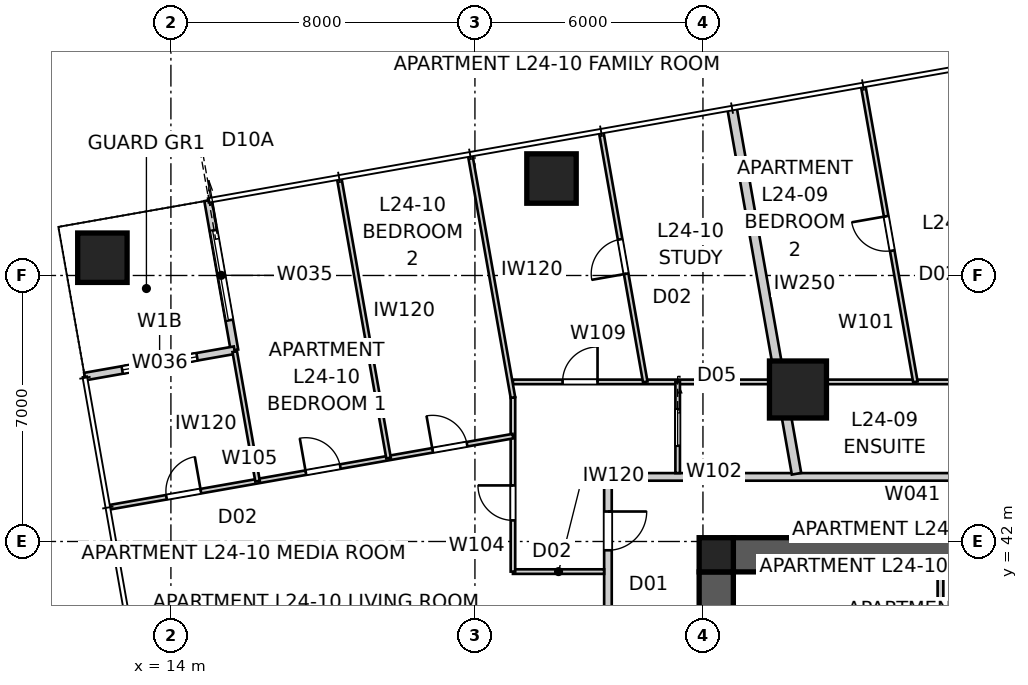
"""IFC4 building model, lengths in metres.
Left out: names, types, materials, properties, quantities, classifications, styles, units other than length and angle.
Written with IfcOpenShell. Run it as: python <this file> out.ifc"""

import sys

from ifc_helpers import new_model, si_unit, direction, frame, frame_2d, origin, origin_2d, place, context, subcontext, project, spatial, polyline, rectangle, outline, extrude, element, fill, save


model = new_model("IFC4")
c1 = context("Model", 3, precision=1e-05, world=origin(), true_north=direction((0.0, 1.0)))
c2 = subcontext(c1, "Body", "Model", "MODEL_VIEW")
j1 = project(units=[si_unit("LENGTHUNIT", "METRE"), si_unit("PLANEANGLEUNIT", "RADIAN")], contexts=[c1])
p1 = place(None, origin())
s1 = spatial("IfcSite", under=j1, at=p1, CompositionType="ELEMENT")
p2 = place(p1, origin())
s2 = spatial("IfcBuilding", under=s1, at=p2, CompositionType="ELEMENT")
p3 = place(p2, frame((0.0, 0.0, 89.6)))
s3 = spatial("IfcBuildingStorey", under=s2, at=p3, CompositionType="ELEMENT", Elevation=89.6)
p4 = place(p3, frame((28.8, 41.65, 0.0), z_axis=(0.0, 0.0, 1.0), x_axis=(1.0, 0.0, 0.0)))
e1 = element("IfcWall", 1, at=p4, inside=s3, PredefinedType="SHEAR", context=c2, shape_type="SweptSolid", body=[
    extrude(outline(polyline([(0.0, -0.45), (22.4, -0.45), (22.4, -0.025), (22.85, -0.025), (22.85, 0.025), (22.4, 0.025), (22.4, 0.45), (0.0, 0.45), (0.0, 0.025), (-0.45, 0.025), (-0.45, -0.025), (0.0, -0.025), (0.0, -0.45)])), origin(), (0.0, 0.0, 1.0), 3.4),
])
p5 = place(p3, frame((28.35, 41.2, 0.0), z_axis=(0.0, 0.0, 1.0), x_axis=(0.0, -1.0, 0.0)))
e2 = element("IfcWall", 2, at=p5, inside=s3, PredefinedType="SHEAR", context=c2, shape_type="SweptSolid", body=[
    extrude(outline(polyline([(0.0, -0.45), (22.4, -0.45), (22.4, -0.025), (22.85, -0.025), (22.85, 0.025), (22.4, 0.025), (22.4, 0.45), (0.0, 0.45), (0.0, 0.025), (-0.45, 0.025), (-0.45, -0.025), (0.0, -0.025), (0.0, -0.45)])), origin(), (0.0, 0.0, 1.0), 3.4),
])
p6 = place(p5, frame((11.14, 0.0, 0.0)))
e3 = element("IfcOpeningElement", 3, at=p6, cuts=e2, PredefinedType="OPENING", context=c2, shape_type="SweptSolid", body=[
    extrude(rectangle(XDim=1.02, YDim=2.4, at=frame_2d((0.51, 1.2))), frame((0.0, 0.46, 0.0), z_axis=(0.0, -1.0, 0.0), x_axis=(1.0, 0.0, 0.0)), (0.0, 0.0, 1.0), 0.92),
])
p7 = place(p3, frame((28.35, 41.65, 0.0), z_axis=(0.0, 0.0, 1.0), x_axis=(1.0, 0.0, 0.0)))
e4 = element("IfcColumn", 4, at=p7, inside=s3, PredefinedType="COLUMN", context=c2, shape_type="SweptSolid", body=[
    extrude(rectangle(XDim=0.9, YDim=0.9, at=origin_2d()), origin(), (0.0, 0.0, 1.0), 3.4),
])
for number, where, z_axis, x_axis in (
    (5, (24.015, 51.552, 0.0), (0.0, 0.0, 1.0), (1.0, 0.0, 0.0)),
    (6, (12.197, 49.468, 0.0), (0.0, 0.0, 1.0), (1.0, 0.0, 0.0)),
):
    element("IfcColumn", number, at=place(p3, frame(where, z_axis=z_axis, x_axis=x_axis)), inside=s3, PredefinedType="COLUMN", context=c2, shape_type="SweptSolid", body=[
        extrude(rectangle(XDim=1.3, YDim=1.3, at=origin_2d()), origin(), (0.0, 0.0, 1.0), 3.4),
    ])
p8 = place(p3, frame((30.5, 46.0, 0.0), z_axis=(0.0, 0.0, 1.0), x_axis=(1.0, 0.0, 0.0)))
e7 = element("IfcColumn", 7, at=p8, inside=s3, PredefinedType="COLUMN", context=c2, shape_type="SweptSolid", body=[
    extrude(rectangle(XDim=1.5, YDim=1.5, at=origin_2d()), origin(), (0.0, 0.0, 1.0), 3.4),
])
p9 = place(p3, frame((14.978, 50.974, 0.0), z_axis=(0.0, 0.0, 1.0), x_axis=(0.173646056486, -0.984808127031, 0.0)))
e8 = element("IfcWall", 8, at=p9, inside=s3, PredefinedType="SOLIDWALL", context=c2, shape_type="SweptSolid", body=[
    extrude(rectangle(XDim=4.0, YDim=0.2, at=frame_2d((2.0, 0.0))), origin(), (0.0, 0.0, 1.0), 3.25),
])
p10 = place(p9, frame((0.8, 0.0, 0.0)))
e9 = element("IfcOpeningElement", 9, at=p10, cuts=e8, PredefinedType="OPENING", context=c2, shape_type="SweptSolid", body=[
    extrude(rectangle(XDim=2.4, YDim=2.1, at=frame_2d((1.2, 1.05))), frame((0.0, 0.11, 0.0), z_axis=(0.0, -1.0, 0.0), x_axis=(1.0, 0.0, 0.0)), (0.0, 0.0, 1.0), 0.22),
])
p11 = place(p3, frame((15.672, 47.034, 0.0), z_axis=(0.0, 0.0, 1.0), x_axis=(-0.984808127031, -0.173646056486, 0.0)))
e10 = element("IfcWall", 10, at=p11, inside=s3, PredefinedType="SOLIDWALL", context=c2, shape_type="SweptSolid", body=[
    extrude(rectangle(XDim=4.0, YDim=0.2, at=frame_2d((2.0, 0.0))), origin(), (0.0, 0.0, 1.0), 3.25),
])
p12 = place(p11, frame((1.0, 0.0, 0.45)))
e11 = element("IfcOpeningElement", 11, at=p12, cuts=e10, PredefinedType="OPENING", context=c2, shape_type="SweptSolid", body=[
    extrude(rectangle(XDim=2.0, YDim=1.8, at=frame_2d((1.0, 0.9))), frame((0.0, 0.11, 0.0), z_axis=(0.0, -1.0, 0.0), x_axis=(1.0, 0.0, 0.0)), (0.0, 0.0, 1.0), 0.22),
])
p13 = place(p3, frame((54.5, 43.7, 0.0), z_axis=(0.0, 0.0, 1.0), x_axis=(-1.0, 0.0, 0.0)))
e12 = element("IfcWall", 12, at=p13, inside=s3, PredefinedType="PARTITIONING", context=c2, shape_type="SweptSolid", body=[
    extrude(rectangle(XDim=29.0, YDim=0.2, at=frame_2d((14.5, 0.0))), origin(), (0.0, 0.0, 1.0), 3.25),
])
p14 = place(p13, frame((11.951, 0.0, 0.0)))
e13 = element("IfcOpeningElement", 13, at=p14, cuts=e12, PredefinedType="OPENING", context=c2, shape_type="SweptSolid", body=[
    extrude(rectangle(XDim=1.02, YDim=2.34, at=frame_2d((0.51, 1.17))), frame((0.0, 0.11, 0.0), z_axis=(0.0, -1.0, 0.0), x_axis=(1.0, 0.0, 0.0)), (0.0, 0.0, 1.0), 0.22),
])
p15 = place(p13, frame((4.795, 0.0, 0.0)))
e14 = element("IfcOpeningElement", 14, at=p15, cuts=e12, PredefinedType="OPENING", context=c2, shape_type="SweptSolid", body=[
    extrude(rectangle(XDim=1.02, YDim=2.34, at=frame_2d((0.51, 1.17))), frame((0.0, 0.11, 0.0), z_axis=(0.0, -1.0, 0.0), x_axis=(1.0, 0.0, 0.0)), (0.0, 0.0, 1.0), 0.22),
])
p16 = place(p3, frame((25.5, 43.7, 0.0), z_axis=(0.0, 0.0, 1.0), x_axis=(0.0, -1.0, 0.0)))
e15 = element("IfcWall", 15, at=p16, inside=s3, PredefinedType="PARTITIONING", context=c2, shape_type="SweptSolid", body=[
    extrude(rectangle(XDim=27.4, YDim=0.2, at=frame_2d((13.7, 0.0))), origin(), (0.0, 0.0, 1.0), 3.25),
])
p17 = place(p16, frame((24.333, 0.0, 0.0)))
e16 = element("IfcOpeningElement", 16, at=p17, cuts=e15, PredefinedType="OPENING", context=c2, shape_type="SweptSolid", body=[
    extrude(rectangle(XDim=1.02, YDim=2.1, at=frame_2d((0.51, 1.05))), frame((0.0, 0.11, 0.0), z_axis=(0.0, -1.0, 0.0), x_axis=(1.0, 0.0, 0.0)), (0.0, 0.0, 1.0), 0.22),
])
p18 = place(p16, frame((10.631, 0.0, 0.0)))
e17 = element("IfcOpeningElement", 17, at=p18, cuts=e15, PredefinedType="OPENING", context=c2, shape_type="SweptSolid", body=[
    extrude(rectangle(XDim=1.02, YDim=2.34, at=frame_2d((0.51, 1.17))), frame((0.0, 0.11, 0.0), z_axis=(0.0, -1.0, 0.0), x_axis=(1.0, 0.0, 0.0)), (0.0, 0.0, 1.0), 0.22),
])
p19 = place(p16, frame((0.911, 0.0, 0.0)))
e18 = element("IfcOpeningElement", 18, at=p19, cuts=e15, PredefinedType="OPENING", context=c2, shape_type="SweptSolid", body=[
    extrude(rectangle(XDim=1.02, YDim=2.34, at=frame_2d((0.51, 1.17))), frame((0.0, 0.11, 0.0), z_axis=(0.0, -1.0, 0.0), x_axis=(1.0, 0.0, 0.0)), (0.0, 0.0, 1.0), 0.22),
])
p20 = place(p3, frame((28.765, 53.405, 0.0), z_axis=(0.0, 0.0, 1.0), x_axis=(0.173658469802, -0.984805938176, 0.0)))
e19 = element("IfcWall", 19, at=p20, inside=s3, PredefinedType="PARTITIONING", context=c2, shape_type="SweptSolid", body=[
    extrude(rectangle(XDim=9.771, YDim=0.25, at=frame_2d((4.885, 0.0))), origin(), (0.0, 0.0, 1.0), 3.25),
])
p21 = place(p3, frame((34.25, 41.2, 0.0), z_axis=(0.0, 0.0, 1.0), x_axis=(0.0, -1.0, 0.0)))
e20 = element("IfcWall", 20, at=p21, inside=s3, PredefinedType="SOLIDWALL", context=c2, shape_type="SweptSolid", body=[
    extrude(rectangle(XDim=5.95, YDim=0.15, at=frame_2d((2.975, 0.0))), origin(), (0.0, 0.0, 1.0), 3.25),
])
p22 = place(p21, frame((2.515, 0.0, 0.0)))
e21 = element("IfcOpeningElement", 21, at=p22, cuts=e20, PredefinedType="OPENING", context=c2, shape_type="SweptSolid", body=[
    extrude(rectangle(XDim=0.92, YDim=2.1, at=frame_2d((0.46, 1.05))), frame((0.0, 0.085, 0.0), z_axis=(0.0, -1.0, 0.0), x_axis=(1.0, 0.0, 0.0)), (0.0, 0.0, 1.0), 0.17),
])
p23 = place(p3, frame((23.0, 46.2, 0.0), z_axis=(0.0, 0.0, 1.0), x_axis=(1.0, 0.0, 0.0)))
e22 = element("IfcWall", 22, at=p23, inside=s3, PredefinedType="PARTITIONING", context=c2, shape_type="SweptSolid", body=[
    extrude(rectangle(XDim=34.0, YDim=0.12, at=frame_2d((17.0, 0.0))), origin(), (0.0, 0.0, 1.0), 2.55),
])
p24 = place(p23, frame((18.989, 0.0, 0.0)))
e23 = element("IfcOpeningElement", 23, at=p24, cuts=e22, PredefinedType="OPENING", context=c2, shape_type="SweptSolid", body=[
    extrude(rectangle(XDim=0.92, YDim=2.34, at=frame_2d((0.46, 1.17))), frame((0.0, 0.07, 0.0), z_axis=(0.0, -1.0, 0.0), x_axis=(1.0, 0.0, 0.0)), (0.0, 0.0, 1.0), 0.14),
])
p25 = place(p23, frame((1.306, 0.0, 0.0)))
e24 = element("IfcOpeningElement", 24, at=p25, cuts=e22, PredefinedType="OPENING", context=c2, shape_type="SweptSolid", body=[
    extrude(rectangle(XDim=0.92, YDim=2.34, at=frame_2d((0.46, 1.17))), frame((0.0, 0.07, 0.0), z_axis=(0.0, -1.0, 0.0), x_axis=(1.0, 0.0, 0.0)), (0.0, 0.0, 1.0), 0.14),
])
p26 = place(p23, frame((13.884, 0.0, 0.0)))
e25 = element("IfcOpeningElement", 25, at=p26, cuts=e22, PredefinedType="OPENING", context=c2, shape_type="SweptSolid", body=[
    extrude(rectangle(XDim=0.96, YDim=2.1, at=frame_2d((0.48, 1.05))), frame((0.0, 0.07, 0.0), z_axis=(0.0, -1.0, 0.0), x_axis=(1.0, 0.0, 0.0)), (0.0, 0.0, 1.0), 0.14),
])
p27 = place(p23, frame((21.929, 0.0, 0.0)))
e26 = element("IfcOpeningElement", 26, at=p27, cuts=e22, PredefinedType="OPENING", context=c2, shape_type="SweptSolid", body=[
    extrude(rectangle(XDim=0.96, YDim=2.1, at=frame_2d((0.48, 1.05))), frame((0.0, 0.07, 0.0), z_axis=(0.0, -1.0, 0.0), x_axis=(1.0, 0.0, 0.0)), (0.0, 0.0, 1.0), 0.14),
])
p28 = place(p3, frame((33.59, 46.2, 0.0), z_axis=(0.0, 0.0, 1.0), x_axis=(-0.173645935638, 0.98480814834, 0.0)))
e27 = element("IfcWall", 27, at=p28, inside=s3, PredefinedType="PARTITIONING", context=c2, shape_type="SweptSolid", body=[
    extrude(rectangle(XDim=7.893, YDim=0.12, at=frame_2d((3.947, 0.0))), origin(), (0.0, 0.0, 1.0), 3.25),
])
p29 = place(p28, frame((3.507, 0.0, 0.0)))
e28 = element("IfcOpeningElement", 28, at=p29, cuts=e27, PredefinedType="OPENING", context=c2, shape_type="SweptSolid", body=[
    extrude(rectangle(XDim=0.92, YDim=2.34, at=frame_2d((0.46, 1.17))), frame((0.0, 0.07, 0.0), z_axis=(0.0, -1.0, 0.0), x_axis=(1.0, 0.0, 0.0)), (0.0, 0.0, 1.0), 0.14),
])
p30 = place(p3, frame((27.335, 46.2, 0.0), z_axis=(0.0, 0.0, 1.0), x_axis=(0.0, -1.0, 0.0)))
e29 = element("IfcWall", 29, at=p30, inside=s3, PredefinedType="PARTITIONING", context=c2, shape_type="SweptSolid", body=[
    extrude(rectangle(XDim=2.4, YDim=0.12, at=frame_2d((1.2, 0.0))), origin(), (0.0, 0.0, 1.0), 2.722),
])
p31 = place(p30, frame((0.72, 0.0, 0.0)))
e30 = element("IfcOpeningElement", 30, at=p31, cuts=e29, PredefinedType="OPENING", context=c2, shape_type="SweptSolid", body=[
    extrude(rectangle(XDim=0.96, YDim=2.1, at=frame_2d((0.48, 1.05))), frame((0.0, 0.07, 0.0), z_axis=(0.0, -1.0, 0.0), x_axis=(1.0, 0.0, 0.0)), (0.0, 0.0, 1.0), 0.14),
])
p32 = place(p3, frame((25.4, 41.208, 0.0), z_axis=(0.0, 0.0, 1.0), x_axis=(-1.0, 0.0, 0.0)))
e31 = element("IfcWall", 31, at=p32, inside=s3, PredefinedType="PARTITIONING", context=c2, shape_type="SweptSolid", body=[
    extrude(rectangle(XDim=2.4, YDim=0.12, at=frame_2d((1.2, 0.0))), origin(), (0.0, 0.0, 1.0), 2.638),
])
p33 = place(p3, frame((23.0, 41.208, 0.0), z_axis=(0.0, 0.0, 1.0), x_axis=(0.0, 1.0, 0.0)))
e32 = element("IfcWall", 32, at=p33, inside=s3, PredefinedType="PARTITIONING", context=c2, shape_type="SweptSolid", body=[
    extrude(rectangle(XDim=4.581, YDim=0.12, at=frame_2d((2.291, 0.0))), origin(), (0.0, 0.0, 1.0), 2.638),
])
p34 = place(p33, frame((1.348, 0.0, 0.0)))
e33 = element("IfcOpeningElement", 33, at=p34, cuts=e32, PredefinedType="OPENING", context=c2, shape_type="SweptSolid", body=[
    extrude(rectangle(XDim=0.92, YDim=2.34, at=frame_2d((0.46, 1.17))), frame((0.0, 0.07, 0.0), z_axis=(0.0, -1.0, 0.0), x_axis=(1.0, 0.0, 0.0)), (0.0, 0.0, 1.0), 0.14),
])
p35 = place(p3, frame((12.38, 42.9, 0.0), z_axis=(0.0, 0.0, 1.0), x_axis=(0.984807253583, 0.173651010046, 0.0)))
e34 = element("IfcWall", 34, at=p35, inside=s3, PredefinedType="PARTITIONING", context=c2, shape_type="SweptSolid", body=[
    extrude(rectangle(XDim=10.783, YDim=0.12, at=frame_2d((5.392, 0.0))), origin(), (0.0, 0.0, 1.0), 3.25),
])
p36 = place(p35, frame((1.525, 0.0, 0.0)))
e35 = element("IfcOpeningElement", 35, at=p36, cuts=e34, PredefinedType="OPENING", context=c2, shape_type="SweptSolid", body=[
    extrude(rectangle(XDim=0.92, YDim=2.34, at=frame_2d((0.46, 1.17))), frame((0.0, 0.07, 0.0), z_axis=(0.0, -1.0, 0.0), x_axis=(1.0, 0.0, 0.0)), (0.0, 0.0, 1.0), 0.14),
])
p37 = place(p35, frame((5.25, 0.0, 0.0)))
e36 = element("IfcOpeningElement", 36, at=p37, cuts=e34, PredefinedType="OPENING", context=c2, shape_type="SweptSolid", body=[
    extrude(rectangle(XDim=0.92, YDim=2.34, at=frame_2d((0.46, 1.17))), frame((0.0, 0.07, 0.0), z_axis=(0.0, -1.0, 0.0), x_axis=(1.0, 0.0, 0.0)), (0.0, 0.0, 1.0), 0.14),
])
p38 = place(p35, frame((8.637, 0.0, 0.0)))
e37 = element("IfcOpeningElement", 37, at=p38, cuts=e34, PredefinedType="OPENING", context=c2, shape_type="SweptSolid", body=[
    extrude(rectangle(XDim=0.92, YDim=2.34, at=frame_2d((0.46, 1.17))), frame((0.0, 0.07, 0.0), z_axis=(0.0, -1.0, 0.0), x_axis=(1.0, 0.0, 0.0)), (0.0, 0.0, 1.0), 0.14),
])
p39 = place(p3, frame((18.432, 51.542, 0.0), z_axis=(0.0, 0.0, 1.0), x_axis=(0.173647177755, -0.984807929323, 0.0)))
e38 = element("IfcWall", 38, at=p39, inside=s3, PredefinedType="PARTITIONING", context=c2, shape_type="SweptSolid", body=[
    extrude(rectangle(XDim=7.46, YDim=0.12, at=frame_2d((3.73, 0.0))), origin(), (0.0, 0.0, 1.0), 3.25),
])
p40 = place(p3, frame((16.28, 43.588, 0.0), z_axis=(0.0, 0.0, 1.0), x_axis=(-0.173660541335, 0.984805572884, 0.0)))
e39 = element("IfcWall", 39, at=p40, inside=s3, PredefinedType="PARTITIONING", context=c2, shape_type="SweptSolid", body=[
    extrude(rectangle(XDim=3.46, YDim=0.12, at=frame_2d((1.73, 0.0))), origin(), (0.0, 0.0, 1.0), 3.25),
])
p41 = place(p3, frame((21.878, 52.15, 0.0), z_axis=(0.0, 0.0, 1.0), x_axis=(0.173653792983, -0.984806762864, 0.0)))
e40 = element("IfcWall", 40, at=p41, inside=s3, PredefinedType="PARTITIONING", context=c2, shape_type="SweptSolid", body=[
    extrude(rectangle(XDim=6.459, YDim=0.12, at=frame_2d((3.229, 0.0))), origin(), (0.0, 0.0, 1.0), 2.638),
])
p42 = place(p3, frame((26.481, 46.2, 0.0), z_axis=(0.0, 0.0, 1.0), x_axis=(-0.173643103339, 0.98480864774, 0.0)))
e41 = element("IfcWall", 41, at=p42, inside=s3, PredefinedType="PARTITIONING", context=c2, shape_type="SweptSolid", body=[
    extrude(rectangle(XDim=6.659, YDim=0.12, at=frame_2d((3.329, 0.0))), origin(), (0.0, 0.0, 1.0), 3.25),
])
p43 = place(p42, frame((2.889, 0.0, 0.0)))
e42 = element("IfcOpeningElement", 42, at=p43, cuts=e41, PredefinedType="OPENING", context=c2, shape_type="SweptSolid", body=[
    extrude(rectangle(XDim=0.92, YDim=2.34, at=frame_2d((0.46, 1.17))), frame((0.0, 0.07, 0.0), z_axis=(0.0, -1.0, 0.0), x_axis=(1.0, 0.0, 0.0)), (0.0, 0.0, 1.0), 0.14),
])
p44 = place(p10, origin())
e43 = element("IfcDoor", 43, at=p44, inside=s3, OperationType="SLIDING_TO_LEFT", PredefinedType="DOOR", context=c2, shape_type="SweptSolid", body=[
    extrude(rectangle(XDim=2.4, YDim=2.1, at=frame_2d((1.2, 1.05))), frame((0.0, 0.025, 0.0), z_axis=(0.0, -1.0, 0.0), x_axis=(1.0, 0.0, 0.0)), (0.0, 0.0, 1.0), 0.05),
])
fill(e9, e43)
p45 = place(p12, origin())
e44 = element("IfcWindow", 44, at=p45, inside=s3, PartitioningType="SINGLE_PANEL", PredefinedType="WINDOW", context=c2, shape_type="SweptSolid", body=[
    extrude(rectangle(XDim=2.0, YDim=1.8, at=frame_2d((1.0, 0.9))), frame((0.0, 0.03, 0.0), z_axis=(0.0, -1.0, 0.0), x_axis=(1.0, 0.0, 0.0)), (0.0, 0.0, 1.0), 0.06),
])
fill(e11, e44)
p46 = place(p19, origin())
e45 = element("IfcDoor", 45, at=p46, inside=s3, OperationType="SINGLE_SWING_LEFT", PredefinedType="DOOR", context=c2, shape_type="SweptSolid", body=[
    extrude(rectangle(XDim=1.02, YDim=2.34, at=frame_2d((0.51, 1.17))), frame((0.0, 0.025, 0.0), z_axis=(0.0, -1.0, 0.0), x_axis=(1.0, 0.0, 0.0)), (0.0, 0.0, 1.0), 0.05),
])
fill(e18, e45)
p47 = place(p34, origin())
e46 = element("IfcDoor", 46, at=p47, inside=s3, OperationType="SINGLE_SWING_RIGHT", PredefinedType="DOOR", context=c2, shape_type="SweptSolid", body=[
    extrude(rectangle(XDim=0.92, YDim=2.34, at=frame_2d((0.46, 1.17))), frame((0.0, 0.025, 0.0), z_axis=(0.0, -1.0, 0.0), x_axis=(1.0, 0.0, 0.0)), (0.0, 0.0, 1.0), 0.05),
])
fill(e33, e46)
p48 = place(p25, origin())
e47 = element("IfcDoor", 47, at=p48, inside=s3, OperationType="SINGLE_SWING_RIGHT", PredefinedType="DOOR", context=c2, shape_type="SweptSolid", body=[
    extrude(rectangle(XDim=0.92, YDim=2.34, at=frame_2d((0.46, 1.17))), frame((0.0, 0.025, 0.0), z_axis=(0.0, -1.0, 0.0), x_axis=(1.0, 0.0, 0.0)), (0.0, 0.0, 1.0), 0.05),
])
fill(e24, e47)
p49 = place(p31, origin())
e48 = element("IfcDoor", 48, at=p49, inside=s3, OperationType="SLIDING_TO_LEFT", PredefinedType="DOOR", context=c2, shape_type="SweptSolid", body=[
    extrude(rectangle(XDim=0.96, YDim=2.1, at=frame_2d((0.48, 1.05))), frame((0.0, 0.025, 0.0), z_axis=(0.0, -1.0, 0.0), x_axis=(1.0, 0.0, 0.0)), (0.0, 0.0, 1.0), 0.05),
])
fill(e30, e48)
p50 = place(p36, origin())
e49 = element("IfcDoor", 49, at=p50, inside=s3, OperationType="SINGLE_SWING_RIGHT", PredefinedType="DOOR", context=c2, shape_type="SweptSolid", body=[
    extrude(rectangle(XDim=0.92, YDim=2.34, at=frame_2d((0.46, 1.17))), frame((0.0, 0.025, 0.0), z_axis=(0.0, -1.0, 0.0), x_axis=(1.0, 0.0, 0.0)), (0.0, 0.0, 1.0), 0.05),
])
fill(e35, e49)
p51 = place(p37, origin())
e50 = element("IfcDoor", 50, at=p51, inside=s3, OperationType="SINGLE_SWING_LEFT", PredefinedType="DOOR", context=c2, shape_type="SweptSolid", body=[
    extrude(rectangle(XDim=0.92, YDim=2.34, at=frame_2d((0.46, 1.17))), frame((0.0, 0.025, 0.0), z_axis=(0.0, -1.0, 0.0), x_axis=(1.0, 0.0, 0.0)), (0.0, 0.0, 1.0), 0.05),
])
fill(e36, e50)
p52 = place(p38, origin())
e51 = element("IfcDoor", 51, at=p52, inside=s3, OperationType="SINGLE_SWING_LEFT", PredefinedType="DOOR", context=c2, shape_type="SweptSolid", body=[
    extrude(rectangle(XDim=0.92, YDim=2.34, at=frame_2d((0.46, 1.17))), frame((0.0, 0.025, 0.0), z_axis=(0.0, -1.0, 0.0), x_axis=(1.0, 0.0, 0.0)), (0.0, 0.0, 1.0), 0.05),
])
fill(e37, e51)
p53 = place(p43, origin())
e52 = element("IfcDoor", 52, at=p53, inside=s3, OperationType="SINGLE_SWING_LEFT", PredefinedType="DOOR", context=c2, shape_type="SweptSolid", body=[
    extrude(rectangle(XDim=0.92, YDim=2.34, at=frame_2d((0.46, 1.17))), frame((0.0, 0.025, 0.0), z_axis=(0.0, -1.0, 0.0), x_axis=(1.0, 0.0, 0.0)), (0.0, 0.0, 1.0), 0.05),
])
fill(e42, e52)
p54 = place(p29, origin())
e53 = element("IfcDoor", 53, at=p54, inside=s3, OperationType="SINGLE_SWING_RIGHT", PredefinedType="DOOR", context=c2, shape_type="SweptSolid", body=[
    extrude(rectangle(XDim=0.92, YDim=2.34, at=frame_2d((0.46, 1.17))), frame((0.0, 0.025, 0.0), z_axis=(0.0, -1.0, 0.0), x_axis=(1.0, 0.0, 0.0)), (0.0, 0.0, 1.0), 0.05),
])
fill(e28, e53)
save(model, sys.argv[1])
